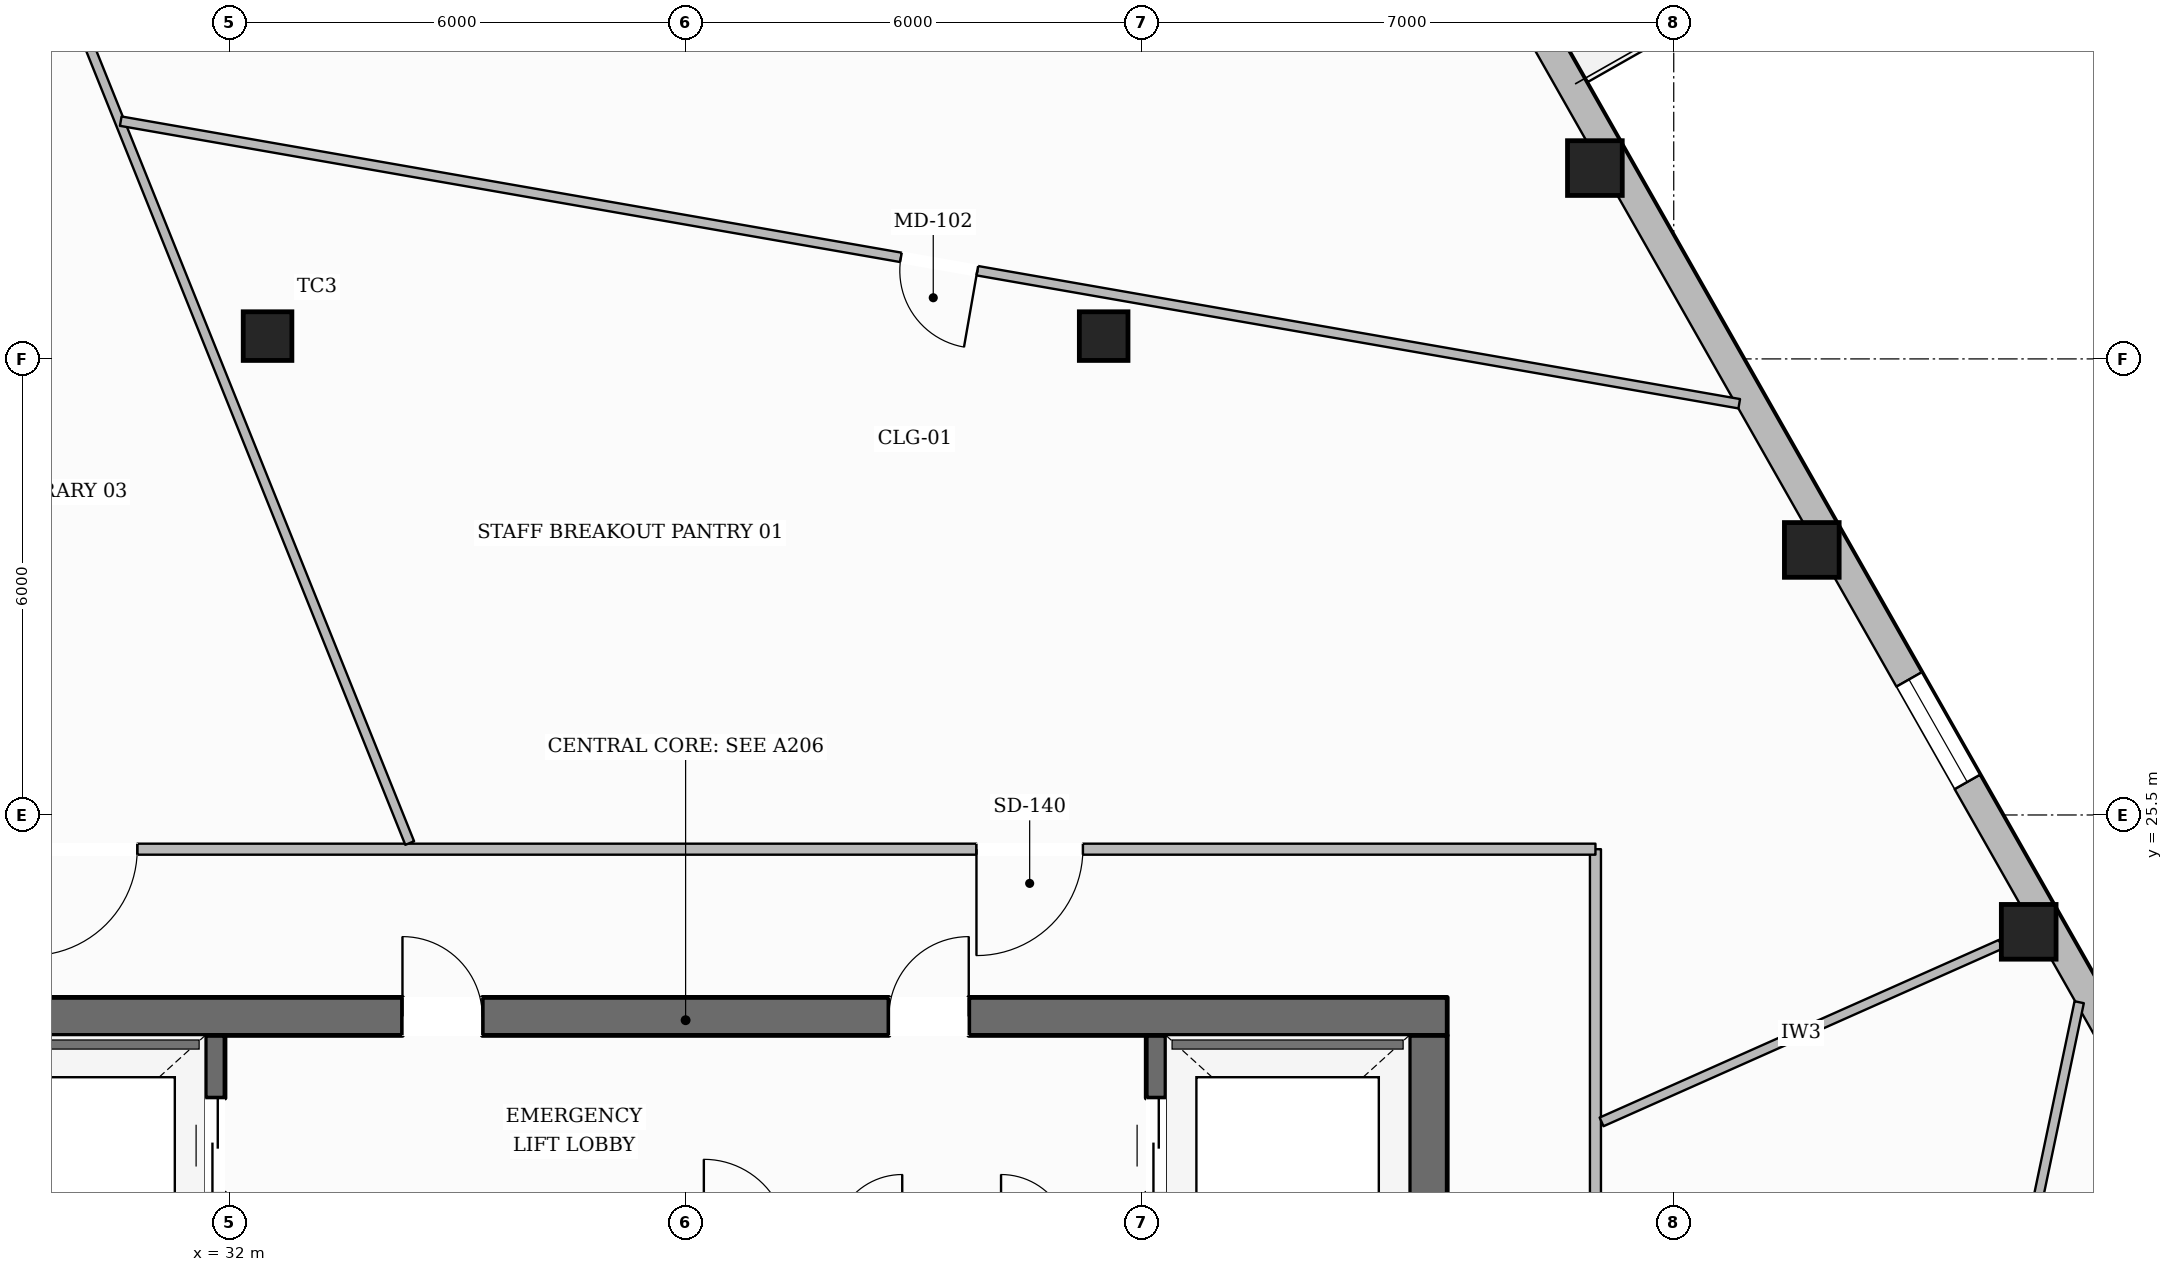
"""IFC4 building model, lengths in metres.
Left out: names, types, materials, properties, quantities, classifications, styles, units other than length and angle.
Written with IfcOpenShell. Run it as: python <this file> out.ifc"""

import sys

from ifc_helpers import new_model, si_unit, direction, frame, frame_2d, origin, origin_2d, place, context, subcontext, project, spatial, rectangle, hollow_rectangle, extrude, element, fill, save


model = new_model("IFC4")
c1 = context("Model", 3, precision=1e-05, world=origin(), true_north=direction((0.0, 1.0)))
c2 = subcontext(c1, "Body", "Model", "MODEL_VIEW")
j1 = project(units=[si_unit("LENGTHUNIT", "METRE"), si_unit("PLANEANGLEUNIT", "RADIAN")], contexts=[c1])
p1 = place(None, origin())
s1 = spatial("IfcSite", under=j1, at=p1, CompositionType="ELEMENT")
p2 = place(p1, origin())
s2 = spatial("IfcBuilding", under=s1, at=p2, CompositionType="ELEMENT")
p3 = place(p2, frame((0.0, 0.0, 89.35)))
s3 = spatial("IfcBuildingStorey", under=s2, at=p3, CompositionType="ELEMENT", Elevation=89.35)
p4 = place(p3, frame((27.98, 22.85, 0.0), z_axis=(0.0, 0.0, 1.0), x_axis=(1.0, 0.0, 0.0)))
e1 = element("IfcWall", 1, at=p4, inside=s3, PredefinedType="SOLIDWALL", context=c2, shape_type="SweptSolid", body=[
    extrude(rectangle(XDim=20.04, YDim=0.5, at=frame_2d((10.02, 0.0))), origin(), (0.0, 0.0, 1.0), 3.6),
])
p5 = place(p4, frame((6.295, 0.0, 0.0)))
e2 = element("IfcOpeningElement", 2, at=p5, cuts=e1, PredefinedType="OPENING", context=c2, shape_type="SweptSolid", body=[
    extrude(rectangle(XDim=1.05, YDim=2.15, at=frame_2d((0.525, 1.075))), frame((0.0, 0.26, 0.0), z_axis=(0.0, -1.0, 0.0), x_axis=(1.0, 0.0, 0.0)), (0.0, 0.0, 1.0), 0.52),
])
p6 = place(p4, frame((12.695, 0.0, 0.0)))
e3 = element("IfcOpeningElement", 3, at=p6, cuts=e1, PredefinedType="OPENING", context=c2, shape_type="SweptSolid", body=[
    extrude(rectangle(XDim=1.05, YDim=2.15, at=frame_2d((0.525, 1.075))), frame((0.0, 0.26, 0.0), z_axis=(0.0, -1.0, 0.0), x_axis=(1.0, 0.0, 0.0)), (0.0, 0.0, 1.0), 0.52),
])
p7 = place(p3, frame((47.77, 9.6, 0.0), z_axis=(0.0, 0.0, 1.0), x_axis=(0.0, 1.0, 0.0)))
e4 = element("IfcWall", 4, at=p7, inside=s3, PredefinedType="SOLIDWALL", context=c2, shape_type="SweptSolid", body=[
    extrude(rectangle(XDim=13.0, YDim=0.5, at=frame_2d((6.5, 0.0))), origin(), (0.0, 0.0, 1.0), 3.6),
])
p8 = place(p7, frame((0.2, 0.0, 0.0)))
e5 = element("IfcOpeningElement", 5, at=p8, cuts=e4, PredefinedType="OPENING", context=c2, shape_type="SweptSolid", body=[
    extrude(rectangle(XDim=1.1, YDim=2.15, at=frame_2d((0.55, 1.075))), frame((0.0, 0.26, 0.0), z_axis=(0.0, -1.0, 0.0), x_axis=(1.0, 0.0, 0.0)), (0.0, 0.0, 1.0), 0.52),
])
p9 = place(p7, frame((8.4, 0.0, 0.0)))
e6 = element("IfcOpeningElement", 6, at=p9, cuts=e4, PredefinedType="OPENING", context=c2, shape_type="SweptSolid", body=[
    extrude(rectangle(XDim=0.9, YDim=2.1, at=frame_2d((0.45, 1.05))), frame((0.0, 0.26, 0.0), z_axis=(0.0, -1.0, 0.0), x_axis=(1.0, 0.0, 0.0)), (0.0, 0.0, 1.0), 0.52),
])
p10 = place(p3, frame((31.81, 9.6, 0.0), z_axis=(0.0, 0.0, 1.0), x_axis=(0.0, 1.0, 0.0)))
e7 = element("IfcWall", 7, at=p10, inside=s3, PredefinedType="SHEAR", context=c2, shape_type="SweptSolid", body=[
    extrude(rectangle(XDim=13.0, YDim=0.26, at=frame_2d((6.5, 0.0))), origin(), (0.0, 0.0, 1.0), 3.6),
])
p11 = place(p10, frame((10.925, 0.0, 0.0)))
e8 = element("IfcOpeningElement", 8, at=p11, cuts=e7, PredefinedType="OPENING", context=c2, shape_type="SweptSolid", body=[
    extrude(rectangle(XDim=1.25, YDim=2.25, at=frame_2d((0.625, 1.125))), frame((0.0, 0.14, 0.0), z_axis=(0.0, -1.0, 0.0), x_axis=(1.0, 0.0, 0.0)), (0.0, 0.0, 1.0), 0.28),
])
p12 = place(p3, frame((44.19, 9.6, 0.0), z_axis=(0.0, 0.0, 1.0), x_axis=(0.0, 1.0, 0.0)))
e9 = element("IfcWall", 9, at=p12, inside=s3, PredefinedType="SHEAR", context=c2, shape_type="SweptSolid", body=[
    extrude(rectangle(XDim=13.0, YDim=0.26, at=frame_2d((6.5, 0.0))), origin(), (0.0, 0.0, 1.0), 3.6),
])
p13 = place(p12, frame((10.925, 0.0, 0.0)))
e10 = element("IfcOpeningElement", 10, at=p13, cuts=e9, PredefinedType="OPENING", context=c2, shape_type="SweptSolid", body=[
    extrude(rectangle(XDim=1.25, YDim=2.25, at=frame_2d((0.625, 1.125))), frame((0.0, 0.14, 0.0), z_axis=(0.0, -1.0, 0.0), x_axis=(1.0, 0.0, 0.0)), (0.0, 0.0, 1.0), 0.28),
])
for number, where, z_axis, x_axis in (
    (11, (55.67, 23.963, 0.0), (0.0, 0.0, 1.0), (1.0, 0.0, 0.0)),
    (12, (52.816, 28.987, 0.0), (0.0, 0.0, 1.0), (1.0, 0.0, 0.0)),
    (13, (49.963, 34.01, 0.0), (0.0, 0.0, 1.0), (1.0, 0.0, 0.0)),
):
    element("IfcColumn", number, at=place(p3, frame(where, z_axis=z_axis, x_axis=x_axis)), inside=s3, PredefinedType="COLUMN", context=c2, shape_type="SweptSolid", body=[
        extrude(hollow_rectangle(XDim=0.72, YDim=0.72, WallThickness=0.032, at=origin_2d()), origin(), (0.0, 0.0, 1.0), 3.6),
    ])
for number, where, z_axis, x_axis in (
    (14, (32.5, 31.8, 0.0), (0.0, 0.0, 1.0), (1.0, 0.0, 0.0)),
    (15, (43.5, 31.8, 0.0), (0.0, 0.0, 1.0), (1.0, 0.0, 0.0)),
):
    element("IfcColumn", number, at=place(p3, frame(where, z_axis=z_axis, x_axis=x_axis)), inside=s3, PredefinedType="COLUMN", context=c2, shape_type="SweptSolid", body=[
        extrude(hollow_rectangle(XDim=0.64, YDim=0.64, WallThickness=0.028, at=origin_2d()), origin(), (0.0, 0.0, 1.0), 3.6),
    ])
p14 = place(p3, frame((13.926, 13.506, 0.0), z_axis=(0.0, 0.0, 1.0), x_axis=(0.496286611319, 0.868158740914, 0.0)))
e16 = element("IfcWall", 16, at=p14, inside=s3, PredefinedType="STANDARD", context=c2, shape_type="SweptSolid", body=[
    extrude(rectangle(XDim=35.785, YDim=0.38, at=frame_2d((17.893, 0.0))), origin(), (0.0, 0.0, 1.0), 3.059),
])
p15 = place(p14, frame((31.63, 0.0, 0.65)))
e17 = element("IfcOpeningElement", 17, at=p15, cuts=e16, PredefinedType="OPENING", context=c2, shape_type="SweptSolid", body=[
    extrude(rectangle(XDim=1.55, YDim=1.75, at=frame_2d((0.775, 0.875))), frame((0.0, 0.2, 0.0), z_axis=(0.0, -1.0, 0.0), x_axis=(1.0, 0.0, 0.0)), (0.0, 0.0, 1.0), 0.4),
])
p16 = place(p14, frame((25.824, 0.0, 0.65)))
e18 = element("IfcOpeningElement", 18, at=p16, cuts=e16, PredefinedType="OPENING", context=c2, shape_type="SweptSolid", body=[
    extrude(rectangle(XDim=1.55, YDim=1.75, at=frame_2d((0.775, 0.875))), frame((0.0, 0.2, 0.0), z_axis=(0.0, -1.0, 0.0), x_axis=(1.0, 0.0, 0.0)), (0.0, 0.0, 1.0), 0.4),
])
p17 = place(p14, frame((20.018, 0.0, 0.65)))
e19 = element("IfcOpeningElement", 19, at=p17, cuts=e16, PredefinedType="OPENING", context=c2, shape_type="SweptSolid", body=[
    extrude(rectangle(XDim=1.55, YDim=1.75, at=frame_2d((0.775, 0.875))), frame((0.0, 0.2, 0.0), z_axis=(0.0, -1.0, 0.0), x_axis=(1.0, 0.0, 0.0)), (0.0, 0.0, 1.0), 0.4),
])
p18 = place(p14, frame((8.407, 0.0, 0.65)))
e20 = element("IfcOpeningElement", 20, at=p18, cuts=e16, PredefinedType="OPENING", context=c2, shape_type="SweptSolid", body=[
    extrude(rectangle(XDim=1.55, YDim=1.75, at=frame_2d((0.775, 0.875))), frame((0.0, 0.2, 0.0), z_axis=(0.0, -1.0, 0.0), x_axis=(1.0, 0.0, 0.0)), (0.0, 0.0, 1.0), 0.4),
])
p19 = place(p14, frame((2.601, 0.0, 0.65)))
e21 = element("IfcOpeningElement", 21, at=p19, cuts=e16, PredefinedType="OPENING", context=c2, shape_type="SweptSolid", body=[
    extrude(rectangle(XDim=1.55, YDim=1.75, at=frame_2d((0.775, 0.875))), frame((0.0, 0.2, 0.0), z_axis=(0.0, -1.0, 0.0), x_axis=(1.0, 0.0, 0.0)), (0.0, 0.0, 1.0), 0.4),
])
p20 = place(p3, frame((44.253, 44.609, 0.0), z_axis=(0.0, 0.0, 1.0), x_axis=(0.493917790196, -0.869508606356, 0.0)))
e22 = element("IfcWall", 22, at=p20, inside=s3, PredefinedType="STANDARD", context=c2, shape_type="SweptSolid", body=[
    extrude(rectangle(XDim=35.62, YDim=0.38, at=frame_2d((17.81, 0.0))), origin(), (0.0, 0.0, 1.0), 3.059),
])
p21 = place(p20, frame((8.505, 0.0, 0.0)))
e23 = element("IfcOpeningElement", 23, at=p21, cuts=e22, PredefinedType="OPENING", context=c2, shape_type="SweptSolid", body=[
    extrude(rectangle(XDim=1.0, YDim=2.2, at=frame_2d((0.5, 1.1))), frame((0.0, 0.2, 0.0), z_axis=(0.0, -1.0, 0.0), x_axis=(1.0, 0.0, 0.0)), (0.0, 0.0, 1.0), 0.4),
])
p22 = place(p20, frame((31.483, 0.0, 0.65)))
e24 = element("IfcOpeningElement", 24, at=p22, cuts=e22, PredefinedType="OPENING", context=c2, shape_type="SweptSolid", body=[
    extrude(rectangle(XDim=1.55, YDim=1.75, at=frame_2d((0.775, 0.875))), frame((0.0, 0.2, 0.0), z_axis=(0.0, -1.0, 0.0), x_axis=(1.0, 0.0, 0.0)), (0.0, 0.0, 1.0), 0.4),
])
p23 = place(p20, frame((25.705, 0.0, 0.65)))
e25 = element("IfcOpeningElement", 25, at=p23, cuts=e22, PredefinedType="OPENING", context=c2, shape_type="SweptSolid", body=[
    extrude(rectangle(XDim=1.55, YDim=1.75, at=frame_2d((0.775, 0.875))), frame((0.0, 0.2, 0.0), z_axis=(0.0, -1.0, 0.0), x_axis=(1.0, 0.0, 0.0)), (0.0, 0.0, 1.0), 0.4),
])
p24 = place(p20, frame((19.927, 0.0, 0.65)))
e26 = element("IfcOpeningElement", 26, at=p24, cuts=e22, PredefinedType="OPENING", context=c2, shape_type="SweptSolid", body=[
    extrude(rectangle(XDim=1.55, YDim=1.75, at=frame_2d((0.775, 0.875))), frame((0.0, 0.2, 0.0), z_axis=(0.0, -1.0, 0.0), x_axis=(1.0, 0.0, 0.0)), (0.0, 0.0, 1.0), 0.4),
])
p25 = place(p20, frame((2.594, 0.0, 0.65)))
e27 = element("IfcOpeningElement", 27, at=p25, cuts=e22, PredefinedType="OPENING", context=c2, shape_type="SweptSolid", body=[
    extrude(rectangle(XDim=1.55, YDim=1.75, at=frame_2d((0.775, 0.875))), frame((0.0, 0.2, 0.0), z_axis=(0.0, -1.0, 0.0), x_axis=(1.0, 0.0, 0.0)), (0.0, 0.0, 1.0), 0.4),
])
p26 = place(p3, frame((49.97, 7.15, 0.0), z_axis=(0.0, 0.0, 1.0), x_axis=(0.0, 1.0, 0.0)))
e28 = element("IfcWall", 28, at=p26, inside=s3, PredefinedType="PARTITIONING", context=c2, shape_type="SweptSolid", body=[
    extrude(rectangle(XDim=17.9, YDim=0.145, at=frame_2d((8.95, 0.0))), origin(), (0.0, 0.0, 1.0), 3.288),
])
p27 = place(p26, frame((6.54, 0.0, 0.0)))
e29 = element("IfcOpeningElement", 29, at=p27, cuts=e28, PredefinedType="OPENING", context=c2, shape_type="SweptSolid", body=[
    extrude(rectangle(XDim=1.4, YDim=2.2, at=frame_2d((0.7, 1.1))), frame((0.0, 0.083, 0.0), z_axis=(0.0, -1.0, 0.0), x_axis=(1.0, 0.0, 0.0)), (0.0, 0.0, 1.0), 0.165),
])
p28 = place(p3, frame((49.97, 25.05, 0.0), z_axis=(0.0, 0.0, 1.0), x_axis=(-1.0, 0.0, 0.0)))
e30 = element("IfcWall", 30, at=p28, inside=s3, PredefinedType="PARTITIONING", context=c2, shape_type="SweptSolid", body=[
    extrude(rectangle(XDim=23.94, YDim=0.145, at=frame_2d((11.97, 0.0))), origin(), (0.0, 0.0, 1.0), 3.6),
])
p29 = place(p28, frame((6.743, 0.0, 0.0)))
e31 = element("IfcOpeningElement", 31, at=p29, cuts=e30, PredefinedType="OPENING", context=c2, shape_type="SweptSolid", body=[
    extrude(rectangle(XDim=1.4, YDim=2.2, at=frame_2d((0.7, 1.1))), frame((0.0, 0.083, 0.0), z_axis=(0.0, -1.0, 0.0), x_axis=(1.0, 0.0, 0.0)), (0.0, 0.0, 1.0), 0.165),
])
p30 = place(p28, frame((19.184, 0.0, 0.0)))
e32 = element("IfcOpeningElement", 32, at=p30, cuts=e30, PredefinedType="OPENING", context=c2, shape_type="SweptSolid", body=[
    extrude(rectangle(XDim=1.4, YDim=2.2, at=frame_2d((0.7, 1.1))), frame((0.0, 0.083, 0.0), z_axis=(0.0, -1.0, 0.0), x_axis=(1.0, 0.0, 0.0)), (0.0, 0.0, 1.0), 0.165),
])
p31 = place(p3, frame((50.051, 21.462, 0.0), z_axis=(0.0, 0.0, 1.0), x_axis=(0.913638062083, 0.406528586341, 0.0)))
e33 = element("IfcWall", 33, at=p31, inside=s3, PredefinedType="PARTITIONING", context=c2, shape_type="SweptSolid", body=[
    extrude(rectangle(XDim=5.748, YDim=0.125, at=frame_2d((2.874, 0.0))), origin(), (0.0, 0.0, 1.0), 3.141),
])
p32 = place(p3, frame((34.37, 25.131, 0.0), z_axis=(0.0, 0.0, 1.0), x_axis=(-0.372968583389, 0.927843971692, 0.0)))
e34 = element("IfcWall", 34, at=p32, inside=s3, PredefinedType="PARTITIONING", context=c2, shape_type="SweptSolid", body=[
    extrude(rectangle(XDim=14.534, YDim=0.125, at=frame_2d((7.267, 0.0))), origin(), (0.0, 0.0, 1.0), 3.141),
])
p33 = place(p3, frame((51.862, 30.91, 0.0), z_axis=(0.0, 0.0, 1.0), x_axis=(-0.98509938317, 0.17198606129, 0.0)))
e35 = element("IfcWall", 35, at=p33, inside=s3, PredefinedType="PARTITIONING", context=c2, shape_type="SweptSolid", body=[
    extrude(rectangle(XDim=21.615, YDim=0.125, at=frame_2d((10.808, 0.0))), origin(), (0.0, 0.0, 1.0), 3.288),
])
p34 = place(p33, frame((10.176, 0.0, 0.0)))
e36 = element("IfcOpeningElement", 36, at=p34, cuts=e35, PredefinedType="OPENING", context=c2, shape_type="SweptSolid", body=[
    extrude(rectangle(XDim=1.02, YDim=2.15, at=frame_2d((0.51, 1.075))), frame((0.0, 0.073, 0.0), z_axis=(0.0, -1.0, 0.0), x_axis=(1.0, 0.0, 0.0)), (0.0, 0.0, 1.0), 0.145),
])
p35 = place(p3, frame((52.084, 2.727, 0.0), z_axis=(0.0, 0.0, 1.0), x_axis=(0.204797093971, 0.978804449469, 0.0)))
e37 = element("IfcWall", 37, at=p35, inside=s3, PredefinedType="PARTITIONING", context=c2, shape_type="SweptSolid", body=[
    extrude(rectangle(XDim=20.75, YDim=0.125, at=frame_2d((10.375, 0.0))), origin(), (0.0, 0.0, 1.0), 3.288),
])
p36 = place(p35, frame((9.885, 0.0, 0.0)))
e38 = element("IfcOpeningElement", 38, at=p36, cuts=e37, PredefinedType="OPENING", context=c2, shape_type="SweptSolid", body=[
    extrude(rectangle(XDim=0.98, YDim=2.15, at=frame_2d((0.49, 1.075))), frame((0.0, 0.073, 0.0), z_axis=(0.0, -1.0, 0.0), x_axis=(1.0, 0.0, 0.0)), (0.0, 0.0, 1.0), 0.145),
])
p37 = place(p24, origin())
e39 = element("IfcWindow", 39, at=p37, inside=s3, PartitioningType="SINGLE_PANEL", PredefinedType="WINDOW", context=c2, shape_type="SweptSolid", body=[
    extrude(rectangle(XDim=1.55, YDim=1.75, at=frame_2d((0.775, 0.875))), frame((0.0, 0.03, 0.0), z_axis=(0.0, -1.0, 0.0), x_axis=(1.0, 0.0, 0.0)), (0.0, 0.0, 1.0), 0.06),
])
fill(e26, e39)
p38 = place(p5, origin())
e40 = element("IfcDoor", 40, at=p38, inside=s3, OperationType="SINGLE_SWING_LEFT", PredefinedType="DOOR", context=c2, shape_type="SweptSolid", body=[
    extrude(rectangle(XDim=1.05, YDim=2.15, at=frame_2d((0.525, 1.075))), frame((0.0, 0.025, 0.0), z_axis=(0.0, -1.0, 0.0), x_axis=(1.0, 0.0, 0.0)), (0.0, 0.0, 1.0), 0.05),
])
fill(e2, e40)
p39 = place(p6, origin())
e41 = element("IfcDoor", 41, at=p39, inside=s3, OperationType="SINGLE_SWING_RIGHT", PredefinedType="DOOR", context=c2, shape_type="SweptSolid", body=[
    extrude(rectangle(XDim=1.05, YDim=2.15, at=frame_2d((0.525, 1.075))), frame((0.0, 0.025, 0.0), z_axis=(0.0, -1.0, 0.0), x_axis=(1.0, 0.0, 0.0)), (0.0, 0.0, 1.0), 0.05),
])
fill(e3, e41)
p40 = place(p11, origin())
e42 = element("IfcDoor", 42, at=p40, inside=s3, OperationType="DOUBLE_DOOR_SLIDING", PredefinedType="DOOR", context=c2, shape_type="SweptSolid", body=[
    extrude(rectangle(XDim=1.25, YDim=2.25, at=frame_2d((0.625, 1.125))), frame((0.0, 0.025, 0.0), z_axis=(0.0, -1.0, 0.0), x_axis=(1.0, 0.0, 0.0)), (0.0, 0.0, 1.0), 0.05),
])
fill(e8, e42)
p41 = place(p13, origin())
e43 = element("IfcDoor", 43, at=p41, inside=s3, OperationType="DOUBLE_DOOR_SLIDING", PredefinedType="DOOR", context=c2, shape_type="SweptSolid", body=[
    extrude(rectangle(XDim=1.25, YDim=2.25, at=frame_2d((0.625, 1.125))), frame((0.0, 0.025, 0.0), z_axis=(0.0, -1.0, 0.0), x_axis=(1.0, 0.0, 0.0)), (0.0, 0.0, 1.0), 0.05),
])
fill(e10, e43)
p42 = place(p29, origin())
e44 = element("IfcDoor", 44, at=p42, inside=s3, OperationType="SINGLE_SWING_RIGHT", PredefinedType="DOOR", context=c2, shape_type="SweptSolid", body=[
    extrude(rectangle(XDim=1.4, YDim=2.2, at=frame_2d((0.7, 1.1))), frame((0.0, 0.025, 0.0), z_axis=(0.0, -1.0, 0.0), x_axis=(1.0, 0.0, 0.0)), (0.0, 0.0, 1.0), 0.05),
])
fill(e31, e44)
p43 = place(p34, origin())
e45 = element("IfcDoor", 45, at=p43, inside=s3, OperationType="SINGLE_SWING_LEFT", PredefinedType="DOOR", context=c2, shape_type="SweptSolid", body=[
    extrude(rectangle(XDim=1.02, YDim=2.15, at=frame_2d((0.51, 1.075))), frame((0.0, 0.025, 0.0), z_axis=(0.0, -1.0, 0.0), x_axis=(1.0, 0.0, 0.0)), (0.0, 0.0, 1.0), 0.05),
])
fill(e36, e45)
p44 = place(p30, origin())
e46 = element("IfcDoor", 46, at=p44, inside=s3, OperationType="SINGLE_SWING_RIGHT", PredefinedType="DOOR", context=c2, shape_type="SweptSolid", body=[
    extrude(rectangle(XDim=1.4, YDim=2.2, at=frame_2d((0.7, 1.1))), frame((0.0, 0.025, 0.0), z_axis=(0.0, -1.0, 0.0), x_axis=(1.0, 0.0, 0.0)), (0.0, 0.0, 1.0), 0.05),
])
fill(e32, e46)
save(model, sys.argv[1])
